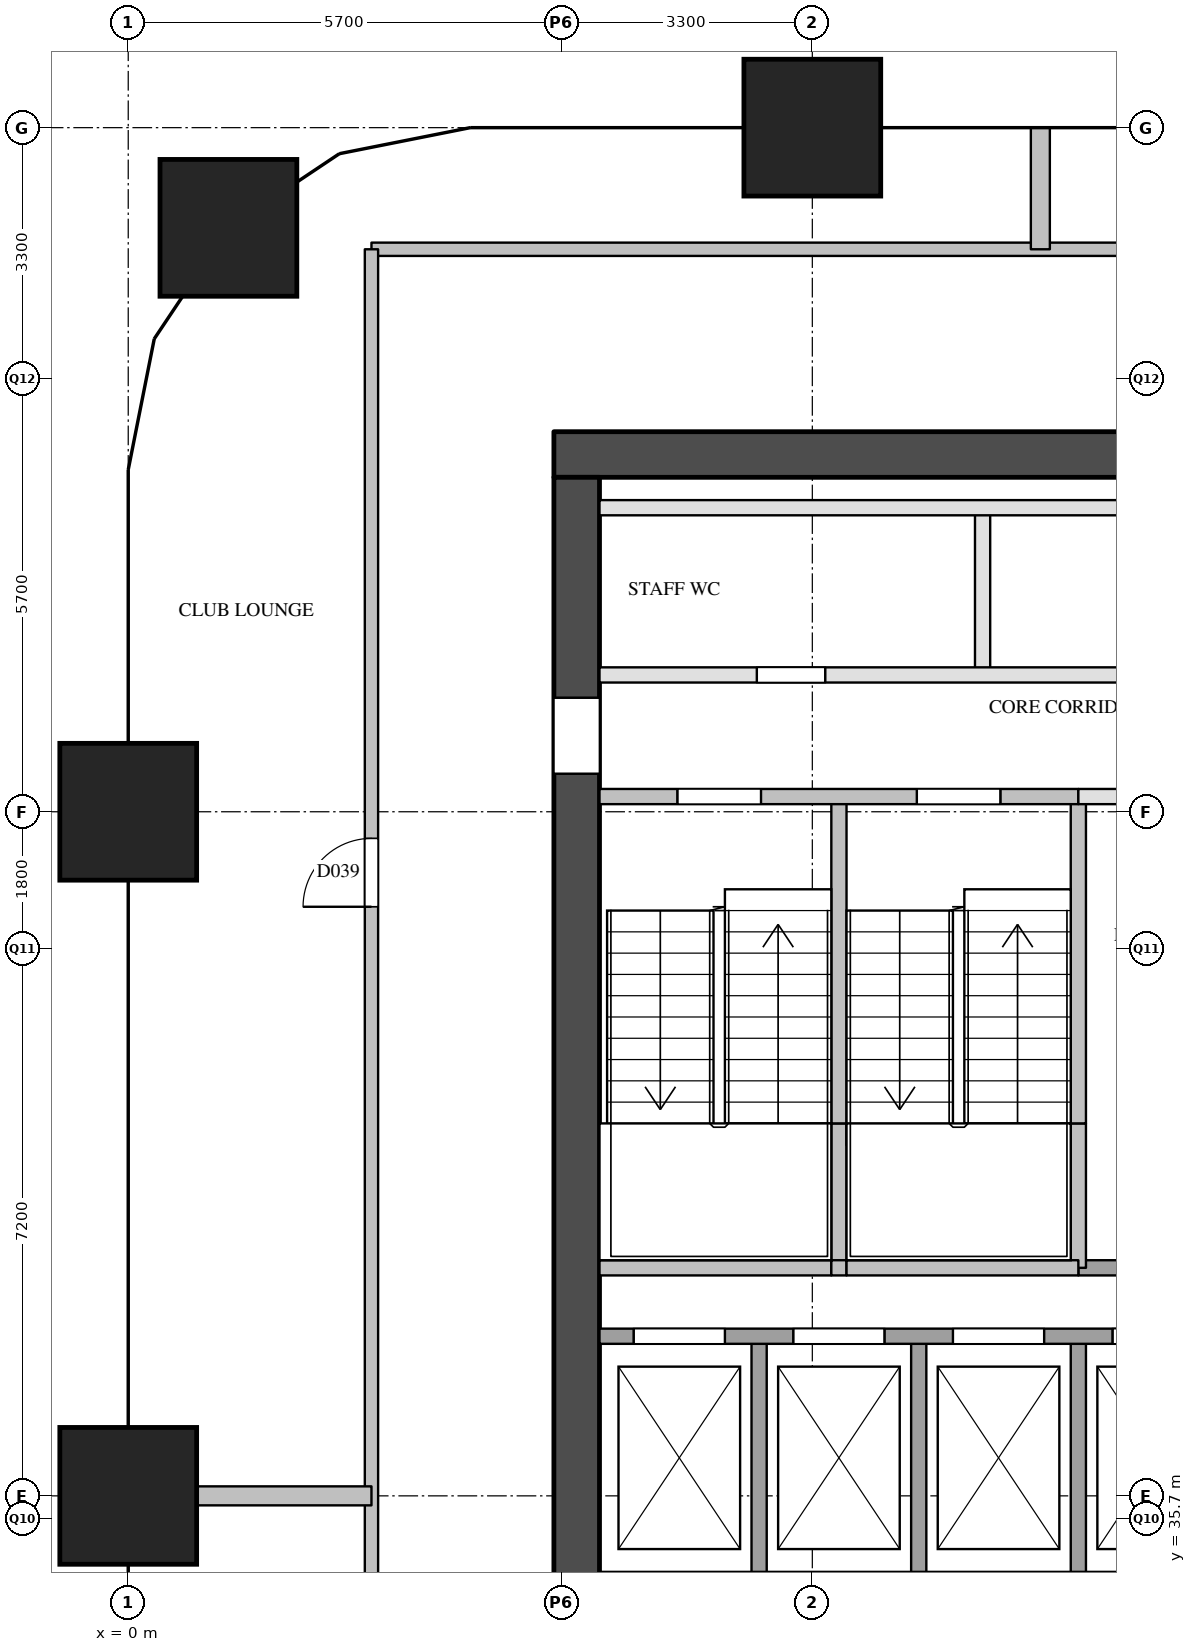
"""IFC4 building model, lengths in metres.
Left out: names, types, materials, properties, quantities, classifications, styles, units other than length and angle.
Written with IfcOpenShell. Run it as: python <this file> out.ifc"""

import sys

from ifc_helpers import new_model, si_unit, direction, frame, frame_2d, origin, origin_2d, place, context, subcontext, project, spatial, rectangle, extrude, element, fill, save


model = new_model("IFC4")
c1 = context("Model", 3, precision=1e-05, world=origin(), true_north=direction((0.0, 1.0)))
c2 = subcontext(c1, "Body", "Model", "MODEL_VIEW")
j1 = project(units=[si_unit("LENGTHUNIT", "METRE"), si_unit("PLANEANGLEUNIT", "RADIAN")], contexts=[c1])
p1 = place(None, origin())
s1 = spatial("IfcSite", under=j1, at=p1, CompositionType="ELEMENT")
p2 = place(p1, origin())
s2 = spatial("IfcBuilding", under=s1, at=p2, CompositionType="ELEMENT")
p3 = place(p2, frame((0.0, 0.0, 38.6)))
s3 = spatial("IfcBuildingStorey", under=s2, at=p3, CompositionType="ELEMENT", Elevation=38.6)
for number, where, z_axis, x_axis in (
    (1, (0.0, 36.0, 0.0), (0.0, 0.0, 1.0), (1.0, 0.0, 0.0)),
    (2, (0.0, 45.0, 0.0), (0.0, 0.0, 1.0), (1.0, 0.0, 0.0)),
    (3, (1.318, 52.682, 0.0), (0.0, 0.0, 1.0), (1.0, 0.0, 0.0)),
    (4, (9.0, 54.0, 0.0), (0.0, 0.0, 1.0), (1.0, 0.0, 0.0)),
):
    element("IfcColumn", number, at=place(p3, frame(where, z_axis=z_axis, x_axis=x_axis)), inside=s3, PredefinedType="COLUMN", context=c2, shape_type="SweptSolid", body=[
        extrude(rectangle(XDim=1.8, YDim=1.8, at=origin_2d()), origin(), (0.0, 0.0, 1.0), 3.8),
    ])
p4 = place(p3, frame((5.6, 49.7, 0.0), z_axis=(0.0, 0.0, 1.0), x_axis=(1.0, 0.0, 0.0)))
e5 = element("IfcWall", 5, at=p4, inside=s3, PredefinedType="SHEAR", context=c2, shape_type="SweptSolid", body=[
    extrude(rectangle(XDim=12.4, YDim=0.6, at=frame_2d((6.2, 0.0))), origin(), (0.0, 0.0, 1.0), 3.5),
])
p5 = place(p3, frame((5.9, 29.1, 0.0), z_axis=(0.0, 0.0, 1.0), x_axis=(0.0, 1.0, 0.0)))
e6 = element("IfcWall", 6, at=p5, inside=s3, PredefinedType="SHEAR", context=c2, shape_type="SweptSolid", body=[
    extrude(rectangle(XDim=20.3, YDim=0.6, at=frame_2d((10.15, 0.0))), origin(), (0.0, 0.0, 1.0), 3.5),
])
p6 = place(p5, frame((3.6, 0.0, 0.0)))
e7 = element("IfcOpeningElement", 7, at=p6, cuts=e6, PredefinedType="OPENING", context=c2, shape_type="SweptSolid", body=[
    extrude(rectangle(XDim=1.8, YDim=2.1, at=frame_2d((0.9, 1.05))), frame((0.0, 0.31, 0.0), z_axis=(0.0, -1.0, 0.0), x_axis=(1.0, 0.0, 0.0)), (0.0, 0.0, 1.0), 0.62),
])
p7 = place(p5, frame((16.4, 0.0, 0.0)))
e8 = element("IfcOpeningElement", 8, at=p7, cuts=e6, PredefinedType="OPENING", context=c2, shape_type="SweptSolid", body=[
    extrude(rectangle(XDim=1.0, YDim=2.1, at=frame_2d((0.5, 1.05))), frame((0.0, 0.31, 0.0), z_axis=(0.0, -1.0, 0.0), x_axis=(1.0, 0.0, 0.0)), (0.0, 0.0, 1.0), 0.62),
])
p8 = place(p3, frame((8.3, 34.9, 0.0), z_axis=(0.0, 0.0, 1.0), x_axis=(0.0, 1.0, 0.0)))
e9 = element("IfcWall", 9, at=p8, inside=s3, PredefinedType="SOLIDWALL", context=c2, shape_type="SweptSolid", body=[
    extrude(rectangle(XDim=3.2, YDim=0.2, at=frame_2d((1.6, 0.0))), origin(), (0.0, 0.0, 1.0), 3.5),
])
p9 = place(p3, frame((9.35, 39.0, 0.0), z_axis=(0.0, 0.0, 1.0), x_axis=(0.0, 1.0, 0.0)))
e10 = element("IfcWall", 10, at=p9, inside=s3, PredefinedType="SOLIDWALL", context=c2, shape_type="SweptSolid", body=[
    extrude(rectangle(XDim=1.9, YDim=0.2, at=frame_2d((0.95, 0.0))), origin(), (0.0, 0.0, 1.0), 3.5),
])
p10 = place(p3, frame((9.35, 40.9, 0.0), z_axis=(0.0, 0.0, 1.0), x_axis=(0.0, 1.0, 0.0)))
e11 = element("IfcWall", 11, at=p10, inside=s3, PredefinedType="SOLIDWALL", context=c2, shape_type="SweptSolid", body=[
    extrude(rectangle(XDim=4.3, YDim=0.2, at=frame_2d((2.15, 0.0))), origin(), (0.0, 0.0, 1.0), 3.5),
])
p11 = place(p3, frame((10.4, 34.9, 0.0), z_axis=(0.0, 0.0, 1.0), x_axis=(0.0, 1.0, 0.0)))
e12 = element("IfcWall", 12, at=p11, inside=s3, PredefinedType="SOLIDWALL", context=c2, shape_type="SweptSolid", body=[
    extrude(rectangle(XDim=3.2, YDim=0.2, at=frame_2d((1.6, 0.0))), origin(), (0.0, 0.0, 1.0), 3.5),
])
p12 = place(p3, frame((11.24, 46.8, 0.0), z_axis=(0.0, 0.0, 1.0), x_axis=(0.0, 1.0, 0.0)))
e13 = element("IfcWall", 13, at=p12, inside=s3, PredefinedType="PARTITIONING", context=c2, shape_type="SweptSolid", body=[
    extrude(rectangle(XDim=2.2, YDim=0.2, at=frame_2d((1.1, 0.0))), origin(), (0.0, 0.0, 1.0), 3.5),
])
p13 = place(p3, frame((12.5, 34.9, 0.0), z_axis=(0.0, 0.0, 1.0), x_axis=(0.0, 1.0, 0.0)))
e14 = element("IfcWall", 14, at=p13, inside=s3, PredefinedType="SOLIDWALL", context=c2, shape_type="SweptSolid", body=[
    extrude(rectangle(XDim=3.2, YDim=0.2, at=frame_2d((1.6, 0.0))), origin(), (0.0, 0.0, 1.0), 3.5),
])
p14 = place(p3, frame((12.5, 39.0, 0.0), z_axis=(0.0, 0.0, 1.0), x_axis=(0.0, 1.0, 0.0)))
e15 = element("IfcWall", 15, at=p14, inside=s3, PredefinedType="SOLIDWALL", context=c2, shape_type="SweptSolid", body=[
    extrude(rectangle(XDim=1.9, YDim=0.2, at=frame_2d((0.95, 0.0))), origin(), (0.0, 0.0, 1.0), 3.5),
])
p15 = place(p3, frame((12.5, 40.9, 0.0), z_axis=(0.0, 0.0, 1.0), x_axis=(0.0, 1.0, 0.0)))
e16 = element("IfcWall", 16, at=p15, inside=s3, PredefinedType="SOLIDWALL", context=c2, shape_type="SweptSolid", body=[
    extrude(rectangle(XDim=4.3, YDim=0.2, at=frame_2d((2.15, 0.0))), origin(), (0.0, 0.0, 1.0), 3.5),
])
p16 = place(p3, frame((6.2, 38.1, 0.0), z_axis=(0.0, 0.0, 1.0), x_axis=(1.0, 0.0, 0.0)))
e17 = element("IfcWall", 17, at=p16, inside=s3, PredefinedType="SOLIDWALL", context=c2, shape_type="SweptSolid", body=[
    extrude(rectangle(XDim=11.2, YDim=0.2, at=frame_2d((5.6, 0.0))), origin(), (0.0, 0.0, 1.0), 3.5),
])
p17 = place(p16, frame((0.45, 0.0, 0.0)))
e18 = element("IfcOpeningElement", 18, at=p17, cuts=e17, PredefinedType="OPENING", context=c2, shape_type="SweptSolid", body=[
    extrude(rectangle(XDim=1.2, YDim=2.1, at=frame_2d((0.6, 1.05))), frame((0.0, 0.11, 0.0), z_axis=(0.0, -1.0, 0.0), x_axis=(1.0, 0.0, 0.0)), (0.0, 0.0, 1.0), 0.22),
])
p18 = place(p16, frame((2.55, 0.0, 0.0)))
e19 = element("IfcOpeningElement", 19, at=p18, cuts=e17, PredefinedType="OPENING", context=c2, shape_type="SweptSolid", body=[
    extrude(rectangle(XDim=1.2, YDim=2.1, at=frame_2d((0.6, 1.05))), frame((0.0, 0.11, 0.0), z_axis=(0.0, -1.0, 0.0), x_axis=(1.0, 0.0, 0.0)), (0.0, 0.0, 1.0), 0.22),
])
p19 = place(p16, frame((4.65, 0.0, 0.0)))
e20 = element("IfcOpeningElement", 20, at=p19, cuts=e17, PredefinedType="OPENING", context=c2, shape_type="SweptSolid", body=[
    extrude(rectangle(XDim=1.2, YDim=2.1, at=frame_2d((0.6, 1.05))), frame((0.0, 0.11, 0.0), z_axis=(0.0, -1.0, 0.0), x_axis=(1.0, 0.0, 0.0)), (0.0, 0.0, 1.0), 0.22),
])
p20 = place(p16, frame((6.75, 0.0, 0.0)))
e21 = element("IfcOpeningElement", 21, at=p20, cuts=e17, PredefinedType="OPENING", context=c2, shape_type="SweptSolid", body=[
    extrude(rectangle(XDim=1.2, YDim=2.1, at=frame_2d((0.6, 1.05))), frame((0.0, 0.11, 0.0), z_axis=(0.0, -1.0, 0.0), x_axis=(1.0, 0.0, 0.0)), (0.0, 0.0, 1.0), 0.22),
])
p21 = place(p3, frame((12.5, 39.0, 0.0), z_axis=(0.0, 0.0, 1.0), x_axis=(1.0, 0.0, 0.0)))
e22 = element("IfcWall", 22, at=p21, inside=s3, PredefinedType="SOLIDWALL", context=c2, shape_type="SweptSolid", body=[
    extrude(rectangle(XDim=4.9, YDim=0.2, at=frame_2d((2.45, 0.0))), origin(), (0.0, 0.0, 1.0), 3.5),
])
p22 = place(p3, frame((6.2, 39.0, 0.0), z_axis=(0.0, 0.0, 1.0), x_axis=(1.0, 0.0, 0.0)))
e23 = element("IfcWall", 23, at=p22, inside=s3, PredefinedType="SOLIDWALL", context=c2, shape_type="SweptSolid", body=[
    extrude(rectangle(XDim=3.05, YDim=0.2, at=frame_2d((1.525, 0.0))), origin(), (0.0, 0.0, 1.0), 3.5),
])
p23 = place(p3, frame((9.25, 39.0, 0.0), z_axis=(0.0, 0.0, 1.0), x_axis=(1.0, 0.0, 0.0)))
e24 = element("IfcWall", 24, at=p23, inside=s3, PredefinedType="SOLIDWALL", context=c2, shape_type="SweptSolid", body=[
    extrude(rectangle(XDim=0.2, YDim=0.2, at=frame_2d((0.1, 0.0))), origin(), (0.0, 0.0, 1.0), 3.5),
])
p24 = place(p3, frame((9.45, 39.0, 0.0), z_axis=(0.0, 0.0, 1.0), x_axis=(1.0, 0.0, 0.0)))
e25 = element("IfcWall", 25, at=p24, inside=s3, PredefinedType="SOLIDWALL", context=c2, shape_type="SweptSolid", body=[
    extrude(rectangle(XDim=3.05, YDim=0.2, at=frame_2d((1.525, 0.0))), origin(), (0.0, 0.0, 1.0), 3.5),
])
p25 = place(p3, frame((12.5, 45.2, 0.0), z_axis=(0.0, 0.0, 1.0), x_axis=(1.0, 0.0, 0.0)))
e26 = element("IfcWall", 26, at=p25, inside=s3, PredefinedType="PARTITIONING", context=c2, shape_type="SweptSolid", body=[
    extrude(rectangle(XDim=4.9, YDim=0.2, at=frame_2d((2.45, 0.0))), origin(), (0.0, 0.0, 1.0), 3.5),
])
p26 = place(p25, frame((2.0, 0.0, 0.0)))
e27 = element("IfcOpeningElement", 27, at=p26, cuts=e26, PredefinedType="OPENING", context=c2, shape_type="SweptSolid", body=[
    extrude(rectangle(XDim=0.9, YDim=2.1, at=frame_2d((0.45, 1.05))), frame((0.0, 0.11, 0.0), z_axis=(0.0, -1.0, 0.0), x_axis=(1.0, 0.0, 0.0)), (0.0, 0.0, 1.0), 0.22),
])
p27 = place(p3, frame((6.2, 45.2, 0.0), z_axis=(0.0, 0.0, 1.0), x_axis=(1.0, 0.0, 0.0)))
e28 = element("IfcWall", 28, at=p27, inside=s3, PredefinedType="SOLIDWALL", context=c2, shape_type="SweptSolid", body=[
    extrude(rectangle(XDim=6.3, YDim=0.2, at=frame_2d((3.15, 0.0))), origin(), (0.0, 0.0, 1.0), 3.5),
])
p28 = place(p27, frame((1.025, 0.0, 0.0)))
e29 = element("IfcOpeningElement", 29, at=p28, cuts=e28, PredefinedType="OPENING", context=c2, shape_type="SweptSolid", body=[
    extrude(rectangle(XDim=1.1, YDim=2.1, at=frame_2d((0.55, 1.05))), frame((0.0, 0.11, 0.0), z_axis=(0.0, -1.0, 0.0), x_axis=(1.0, 0.0, 0.0)), (0.0, 0.0, 1.0), 0.22),
])
p29 = place(p27, frame((4.175, 0.0, 0.0)))
e30 = element("IfcOpeningElement", 30, at=p29, cuts=e28, PredefinedType="OPENING", context=c2, shape_type="SweptSolid", body=[
    extrude(rectangle(XDim=1.1, YDim=2.1, at=frame_2d((0.55, 1.05))), frame((0.0, 0.11, 0.0), z_axis=(0.0, -1.0, 0.0), x_axis=(1.0, 0.0, 0.0)), (0.0, 0.0, 1.0), 0.22),
])
p30 = place(p3, frame((6.2, 46.8, 0.0), z_axis=(0.0, 0.0, 1.0), x_axis=(1.0, 0.0, 0.0)))
e31 = element("IfcWall", 31, at=p30, inside=s3, PredefinedType="PARTITIONING", context=c2, shape_type="SweptSolid", body=[
    extrude(rectangle(XDim=11.2, YDim=0.2, at=frame_2d((5.6, 0.0))), origin(), (0.0, 0.0, 1.0), 3.5),
])
p31 = place(p30, frame((2.07, 0.0, 0.0)))
e32 = element("IfcOpeningElement", 32, at=p31, cuts=e31, PredefinedType="OPENING", context=c2, shape_type="SweptSolid", body=[
    extrude(rectangle(XDim=0.9, YDim=2.1, at=frame_2d((0.45, 1.05))), frame((0.0, 0.11, 0.0), z_axis=(0.0, -1.0, 0.0), x_axis=(1.0, 0.0, 0.0)), (0.0, 0.0, 1.0), 0.22),
])
p32 = place(p30, frame((7.67, 0.0, 0.0)))
e33 = element("IfcOpeningElement", 33, at=p32, cuts=e31, PredefinedType="OPENING", context=c2, shape_type="SweptSolid", body=[
    extrude(rectangle(XDim=0.9, YDim=2.1, at=frame_2d((0.45, 1.05))), frame((0.0, 0.11, 0.0), z_axis=(0.0, -1.0, 0.0), x_axis=(1.0, 0.0, 0.0)), (0.0, 0.0, 1.0), 0.22),
])
p33 = place(p3, frame((6.2, 49.0, 0.0), z_axis=(0.0, 0.0, 1.0), x_axis=(1.0, 0.0, 0.0)))
e34 = element("IfcWall", 34, at=p33, inside=s3, PredefinedType="PARTITIONING", context=c2, shape_type="SweptSolid", body=[
    extrude(rectangle(XDim=11.2, YDim=0.2, at=frame_2d((5.6, 0.0))), origin(), (0.0, 0.0, 1.0), 3.5),
])
p34 = place(p3, frame((3.2, 52.4, 0.0), z_axis=(0.0, 0.0, 1.0), x_axis=(1.0, 0.0, 0.0)))
e35 = element("IfcWall", 35, at=p34, inside=s3, PredefinedType="PARTITIONING", context=c2, shape_type="SweptSolid", body=[
    extrude(rectangle(XDim=17.2, YDim=0.175, at=frame_2d((8.6, 0.0))), origin(), (0.0, 0.0, 1.0), 3.5),
])
p35 = place(p3, frame((3.2, 26.1, 0.0), z_axis=(0.0, 0.0, 1.0), x_axis=(0.0, 1.0, 0.0)))
e36 = element("IfcWall", 36, at=p35, inside=s3, PredefinedType="PARTITIONING", context=c2, shape_type="SweptSolid", body=[
    extrude(rectangle(XDim=26.3, YDim=0.175, at=frame_2d((13.15, 0.0))), origin(), (0.0, 0.0, 1.0), 2.5),
])
p36 = place(p35, frame((4.5, 0.0, 0.0)))
e37 = element("IfcOpeningElement", 37, at=p36, cuts=e36, PredefinedType="OPENING", context=c2, shape_type="SweptSolid", body=[
    extrude(rectangle(XDim=0.9, YDim=2.1, at=frame_2d((0.45, 1.05))), frame((0.0, 0.097, 0.0), z_axis=(0.0, -1.0, 0.0), x_axis=(1.0, 0.0, 0.0)), (0.0, 0.0, 1.0), 0.195),
])
p37 = place(p35, frame((17.65, 0.0, 0.0)))
e38 = element("IfcOpeningElement", 38, at=p37, cuts=e36, PredefinedType="OPENING", context=c2, shape_type="SweptSolid", body=[
    extrude(rectangle(XDim=0.9, YDim=2.1, at=frame_2d((0.45, 1.05))), frame((0.0, 0.097, 0.0), z_axis=(0.0, -1.0, 0.0), x_axis=(1.0, 0.0, 0.0)), (0.0, 0.0, 1.0), 0.195),
])
p38 = place(p3, frame((0.0, 36.0, 0.0), z_axis=(0.0, 0.0, 1.0), x_axis=(1.0, 0.0, 0.0)))
e39 = element("IfcWall", 39, at=p38, inside=s3, PredefinedType="PARTITIONING", context=c2, shape_type="SweptSolid", body=[
    extrude(rectangle(XDim=3.2, YDim=0.25, at=frame_2d((1.6, 0.0))), origin(), (0.0, 0.0, 1.0), 3.5),
])
p39 = place(p3, frame((12.0, 52.4, 0.0), z_axis=(0.0, 0.0, 1.0), x_axis=(0.0, 1.0, 0.0)))
e40 = element("IfcWall", 40, at=p39, inside=s3, PredefinedType="PARTITIONING", context=c2, shape_type="SweptSolid", body=[
    extrude(rectangle(XDim=1.6, YDim=0.25, at=frame_2d((0.8, 0.0))), origin(), (0.0, 0.0, 1.0), 2.5),
])
p40 = place(p17, origin())
e41 = element("IfcDoor", 41, at=p40, inside=s3, OperationType="SLIDING_TO_LEFT", PredefinedType="DOOR", context=c2, shape_type="SweptSolid", body=[
    extrude(rectangle(XDim=1.2, YDim=2.1, at=frame_2d((0.6, 1.05))), frame((0.0, 0.025, 0.0), z_axis=(0.0, -1.0, 0.0), x_axis=(1.0, 0.0, 0.0)), (0.0, 0.0, 1.0), 0.05),
])
fill(e18, e41)
p41 = place(p18, origin())
e42 = element("IfcDoor", 42, at=p41, inside=s3, OperationType="SLIDING_TO_LEFT", PredefinedType="DOOR", context=c2, shape_type="SweptSolid", body=[
    extrude(rectangle(XDim=1.2, YDim=2.1, at=frame_2d((0.6, 1.05))), frame((0.0, 0.025, 0.0), z_axis=(0.0, -1.0, 0.0), x_axis=(1.0, 0.0, 0.0)), (0.0, 0.0, 1.0), 0.05),
])
fill(e19, e42)
p42 = place(p19, origin())
e43 = element("IfcDoor", 43, at=p42, inside=s3, OperationType="SLIDING_TO_LEFT", PredefinedType="DOOR", context=c2, shape_type="SweptSolid", body=[
    extrude(rectangle(XDim=1.2, YDim=2.1, at=frame_2d((0.6, 1.05))), frame((0.0, 0.025, 0.0), z_axis=(0.0, -1.0, 0.0), x_axis=(1.0, 0.0, 0.0)), (0.0, 0.0, 1.0), 0.05),
])
fill(e20, e43)
p43 = place(p20, origin())
e44 = element("IfcDoor", 44, at=p43, inside=s3, OperationType="SLIDING_TO_LEFT", PredefinedType="DOOR", context=c2, shape_type="SweptSolid", body=[
    extrude(rectangle(XDim=1.2, YDim=2.1, at=frame_2d((0.6, 1.05))), frame((0.0, 0.025, 0.0), z_axis=(0.0, -1.0, 0.0), x_axis=(1.0, 0.0, 0.0)), (0.0, 0.0, 1.0), 0.05),
])
fill(e21, e44)
p44 = place(p28, origin())
e45 = element("IfcDoor", 45, at=p44, inside=s3, OperationType="SINGLE_SWING_LEFT", PredefinedType="DOOR", context=c2, shape_type="SweptSolid", body=[
    extrude(rectangle(XDim=1.1, YDim=2.1, at=frame_2d((0.55, 1.05))), frame((0.0, 0.025, 0.0), z_axis=(0.0, -1.0, 0.0), x_axis=(1.0, 0.0, 0.0)), (0.0, 0.0, 1.0), 0.05),
])
fill(e29, e45)
p45 = place(p29, origin())
e46 = element("IfcDoor", 46, at=p45, inside=s3, OperationType="SINGLE_SWING_RIGHT", PredefinedType="DOOR", context=c2, shape_type="SweptSolid", body=[
    extrude(rectangle(XDim=1.1, YDim=2.1, at=frame_2d((0.55, 1.05))), frame((0.0, 0.025, 0.0), z_axis=(0.0, -1.0, 0.0), x_axis=(1.0, 0.0, 0.0)), (0.0, 0.0, 1.0), 0.05),
])
fill(e30, e46)
p46 = place(p7, origin())
e47 = element("IfcDoor", 47, at=p46, inside=s3, OperationType="SINGLE_SWING_RIGHT", PredefinedType="DOOR", context=c2, shape_type="SweptSolid", body=[
    extrude(rectangle(XDim=1.0, YDim=2.1, at=frame_2d((0.5, 1.05))), frame((0.0, 0.025, 0.0), z_axis=(0.0, -1.0, 0.0), x_axis=(1.0, 0.0, 0.0)), (0.0, 0.0, 1.0), 0.05),
])
fill(e8, e47)
p47 = place(p31, origin())
e48 = element("IfcDoor", 48, at=p47, inside=s3, OperationType="SINGLE_SWING_LEFT", PredefinedType="DOOR", context=c2, shape_type="SweptSolid", body=[
    extrude(rectangle(XDim=0.9, YDim=2.1, at=frame_2d((0.45, 1.05))), frame((0.0, 0.025, 0.0), z_axis=(0.0, -1.0, 0.0), x_axis=(1.0, 0.0, 0.0)), (0.0, 0.0, 1.0), 0.05),
])
fill(e32, e48)
p48 = place(p37, origin())
e49 = element("IfcDoor", 49, at=p48, inside=s3, OperationType="SINGLE_SWING_LEFT", PredefinedType="DOOR", context=c2, shape_type="SweptSolid", body=[
    extrude(rectangle(XDim=0.9, YDim=2.1, at=frame_2d((0.45, 1.05))), frame((0.0, 0.025, 0.0), z_axis=(0.0, -1.0, 0.0), x_axis=(1.0, 0.0, 0.0)), (0.0, 0.0, 1.0), 0.05),
])
fill(e38, e49)
save(model, sys.argv[1])
